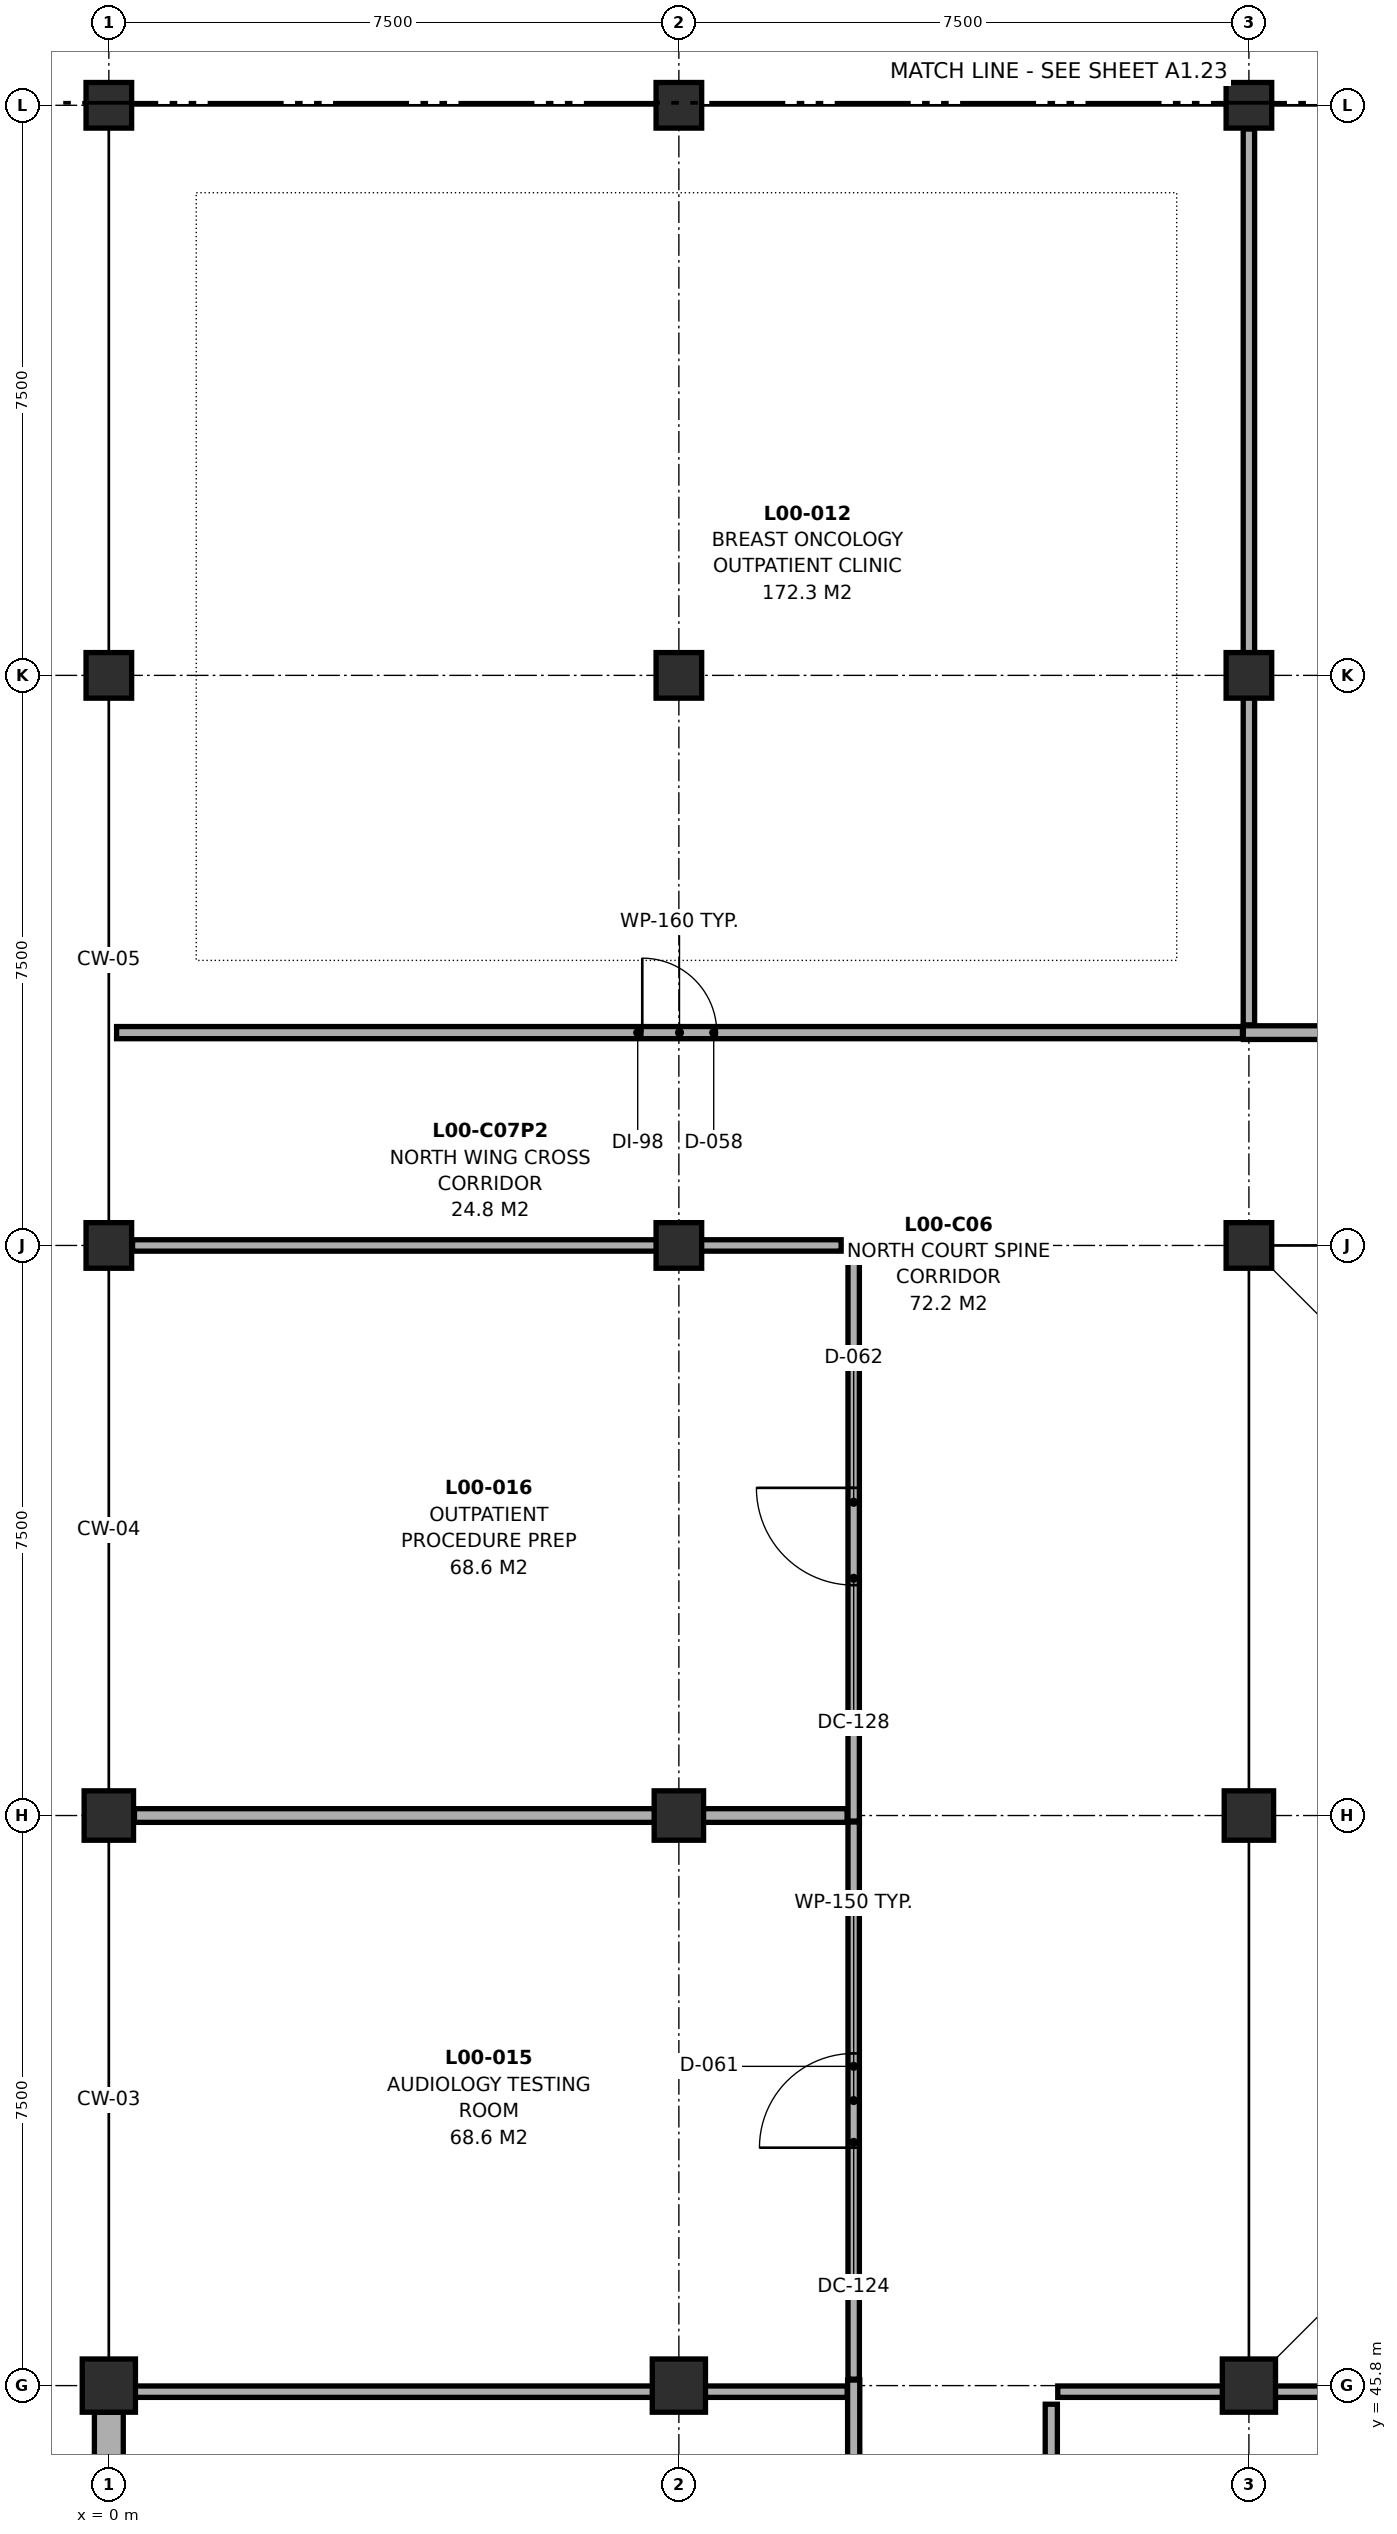
"""IFC4 building model, lengths in metres.
Left out: names, types, materials, properties, quantities, classifications, styles, units other than length and angle.
Written with IfcOpenShell. Run it as: python <this file> out.ifc"""

import sys

from ifc_helpers import new_model, si_unit, direction, frame, frame_2d, origin, origin_2d, place, context, subcontext, project, spatial, rectangle, extrude, element, fill, save


model = new_model("IFC4")
c1 = context("Model", 3, precision=1e-05, world=origin(), true_north=direction((0.0, 1.0)))
c2 = subcontext(c1, "Body", "Model", "MODEL_VIEW")
j1 = project(units=[si_unit("LENGTHUNIT", "METRE"), si_unit("PLANEANGLEUNIT", "RADIAN")], contexts=[c1])
p1 = place(None, origin())
s1 = spatial("IfcSite", under=j1, at=p1, CompositionType="ELEMENT")
p2 = place(p1, origin())
s2 = spatial("IfcBuilding", under=s1, at=p2, CompositionType="ELEMENT")
p3 = place(p2, origin())
s3 = spatial("IfcBuildingStorey", under=s2, at=p3, CompositionType="ELEMENT", Elevation=0.0)
p4 = place(p3, frame((0.0, 45.8, 0.0), z_axis=(0.0, 0.0, 1.0), x_axis=(1.0, 0.0, 0.0)))
e1 = element("IfcColumn", 1, at=p4, inside=s3, PredefinedType="COLUMN", context=c2, shape_type="SweptSolid", body=[
    extrude(rectangle(XDim=0.7, YDim=0.7, at=origin_2d()), origin(), (0.0, 0.0, 1.0), 4.7),
])
p5 = place(p3, frame((0.0, 53.3, 0.0), z_axis=(0.0, 0.0, 1.0), x_axis=(1.0, 0.0, 0.0)))
e2 = element("IfcColumn", 2, at=p5, inside=s3, PredefinedType="COLUMN", context=c2, shape_type="SweptSolid", body=[
    extrude(rectangle(XDim=0.65, YDim=0.65, at=origin_2d()), origin(), (0.0, 0.0, 1.0), 4.7),
])
for number, where, z_axis, x_axis in (
    (3, (0.0, 60.8, 0.0), (0.0, 0.0, 1.0), (1.0, 0.0, 0.0)),
    (4, (0.0, 68.3, 0.0), (0.0, 0.0, 1.0), (1.0, 0.0, 0.0)),
    (5, (0.0, 75.8, 0.0), (0.0, 0.0, 1.0), (1.0, 0.0, 0.0)),
):
    element("IfcColumn", number, at=place(p3, frame(where, z_axis=z_axis, x_axis=x_axis)), inside=s3, PredefinedType="COLUMN", context=c2, shape_type="SweptSolid", body=[
        extrude(rectangle(XDim=0.6, YDim=0.6, at=origin_2d()), origin(), (0.0, 0.0, 1.0), 4.7),
    ])
p6 = place(p3, frame((7.5, 45.8, 0.0), z_axis=(0.0, 0.0, 1.0), x_axis=(1.0, 0.0, 0.0)))
e6 = element("IfcColumn", 6, at=p6, inside=s3, PredefinedType="COLUMN", context=c2, shape_type="SweptSolid", body=[
    extrude(rectangle(XDim=0.7, YDim=0.7, at=origin_2d()), origin(), (0.0, 0.0, 1.0), 4.7),
])
p7 = place(p3, frame((7.5, 53.3, 0.0), z_axis=(0.0, 0.0, 1.0), x_axis=(1.0, 0.0, 0.0)))
e7 = element("IfcColumn", 7, at=p7, inside=s3, PredefinedType="COLUMN", context=c2, shape_type="SweptSolid", body=[
    extrude(rectangle(XDim=0.65, YDim=0.65, at=origin_2d()), origin(), (0.0, 0.0, 1.0), 4.7),
])
for number, where, z_axis, x_axis in (
    (8, (7.5, 60.8, 0.0), (0.0, 0.0, 1.0), (1.0, 0.0, 0.0)),
    (9, (7.5, 68.3, 0.0), (0.0, 0.0, 1.0), (1.0, 0.0, 0.0)),
    (10, (7.5, 75.8, 0.0), (0.0, 0.0, 1.0), (1.0, 0.0, 0.0)),
):
    element("IfcColumn", number, at=place(p3, frame(where, z_axis=z_axis, x_axis=x_axis)), inside=s3, PredefinedType="COLUMN", context=c2, shape_type="SweptSolid", body=[
        extrude(rectangle(XDim=0.6, YDim=0.6, at=origin_2d()), origin(), (0.0, 0.0, 1.0), 4.7),
    ])
p8 = place(p3, frame((15.0, 45.8, 0.0), z_axis=(0.0, 0.0, 1.0), x_axis=(1.0, 0.0, 0.0)))
e11 = element("IfcColumn", 11, at=p8, inside=s3, PredefinedType="COLUMN", context=c2, shape_type="SweptSolid", body=[
    extrude(rectangle(XDim=0.7, YDim=0.7, at=origin_2d()), origin(), (0.0, 0.0, 1.0), 4.7),
])
p9 = place(p3, frame((15.0, 53.3, 0.0), z_axis=(0.0, 0.0, 1.0), x_axis=(1.0, 0.0, 0.0)))
e12 = element("IfcColumn", 12, at=p9, inside=s3, PredefinedType="COLUMN", context=c2, shape_type="SweptSolid", body=[
    extrude(rectangle(XDim=0.65, YDim=0.65, at=origin_2d()), origin(), (0.0, 0.0, 1.0), 4.7),
])
for number, where, z_axis, x_axis in (
    (13, (15.0, 60.8, 0.0), (0.0, 0.0, 1.0), (1.0, 0.0, 0.0)),
    (14, (15.0, 68.3, 0.0), (0.0, 0.0, 1.0), (1.0, 0.0, 0.0)),
    (15, (15.0, 75.8, 0.0), (0.0, 0.0, 1.0), (1.0, 0.0, 0.0)),
):
    element("IfcColumn", number, at=place(p3, frame(where, z_axis=z_axis, x_axis=x_axis)), inside=s3, PredefinedType="COLUMN", context=c2, shape_type="SweptSolid", body=[
        extrude(rectangle(XDim=0.6, YDim=0.6, at=origin_2d()), origin(), (0.0, 0.0, 1.0), 4.7),
    ])
p10 = place(p3, frame((0.0, 38.675, 0.0), z_axis=(0.0, 0.0, 1.0), x_axis=(0.0, 1.0, 0.0)))
e16 = element("IfcWall", 16, at=p10, inside=s3, PredefinedType="SOLIDWALL", context=c2, shape_type="SweptSolid", body=[
    extrude(rectangle(XDim=6.775, YDim=0.38, at=frame_2d((3.387, 0.0))), origin(), (0.0, 0.0, 1.0), 4.035),
])
p11 = place(p3, frame((0.102, 63.6, 0.0), z_axis=(0.0, 0.0, 1.0), x_axis=(1.0, 0.0, 0.0)))
e17 = element("IfcWall", 17, at=p11, inside=s3, PredefinedType="PARTITIONING", context=c2, shape_type="SweptSolid", body=[
    extrude(rectangle(XDim=14.813, YDim=0.16, at=frame_2d((7.406, 0.0))), origin(), (0.0, 0.0, 1.0), 3.765),
])
p12 = place(p11, frame((6.917, 0.0, 0.0)))
e18 = element("IfcOpeningElement", 18, at=p12, cuts=e17, PredefinedType="OPENING", context=c2, shape_type="SweptSolid", body=[
    extrude(rectangle(XDim=0.98, YDim=2.12, at=frame_2d((0.49, 1.06))), frame((0.0, 0.092, 0.0), z_axis=(0.0, -1.0, 0.0), x_axis=(1.0, 0.0, 0.0)), (0.0, 0.0, 1.0), 0.184),
])
p13 = place(p3, frame((14.927, 63.6, 0.0), z_axis=(0.0, 0.0, 1.0), x_axis=(1.0, 0.0, 0.0)))
e19 = element("IfcWall", 19, at=p13, inside=s3, PredefinedType="PARTITIONING", context=c2, shape_type="SweptSolid", body=[
    extrude(rectangle(XDim=14.988, YDim=0.18, at=frame_2d((7.494, 0.0))), origin(), (0.0, 0.0, 1.0), 3.765),
])
p14 = place(p13, frame((6.954, 0.0, 0.0)))
e20 = element("IfcOpeningElement", 20, at=p14, cuts=e19, PredefinedType="OPENING", context=c2, shape_type="SweptSolid", body=[
    extrude(rectangle(XDim=1.08, YDim=2.18, at=frame_2d((0.54, 1.09))), frame((0.0, 0.102, 0.0), z_axis=(0.0, -1.0, 0.0), x_axis=(1.0, 0.0, 0.0)), (0.0, 0.0, 1.0), 0.204),
])
p15 = place(p3, frame((9.8, 45.885, 0.0), z_axis=(0.0, 0.0, 1.0), x_axis=(0.0, 1.0, 0.0)))
e21 = element("IfcWall", 21, at=p15, inside=s3, PredefinedType="PARTITIONING", context=c2, shape_type="SweptSolid", body=[
    extrude(rectangle(XDim=7.33, YDim=0.15, at=frame_2d((3.665, 0.0))), origin(), (0.0, 0.0, 1.0), 3.765),
])
p16 = place(p15, frame((3.045, 0.0, 0.0)))
e22 = element("IfcOpeningElement", 22, at=p16, cuts=e21, PredefinedType="OPENING", context=c2, shape_type="SweptSolid", body=[
    extrude(rectangle(XDim=1.24, YDim=2.2, at=frame_2d((0.62, 1.1))), frame((0.0, 0.087, 0.0), z_axis=(0.0, -1.0, 0.0), x_axis=(1.0, 0.0, 0.0)), (0.0, 0.0, 1.0), 0.174),
])
p17 = place(p3, frame((9.8, 53.227, 0.0), z_axis=(0.0, 0.0, 1.0), x_axis=(0.0, 1.0, 0.0)))
e23 = element("IfcWall", 23, at=p17, inside=s3, PredefinedType="PARTITIONING", context=c2, shape_type="SweptSolid", body=[
    extrude(rectangle(XDim=7.488, YDim=0.15, at=frame_2d((3.744, 0.0))), origin(), (0.0, 0.0, 1.0), 3.765),
])
p18 = place(p17, frame((3.104, 0.0, 0.0)))
e24 = element("IfcOpeningElement", 24, at=p18, cuts=e23, PredefinedType="OPENING", context=c2, shape_type="SweptSolid", body=[
    extrude(rectangle(XDim=1.28, YDim=2.22, at=frame_2d((0.64, 1.11))), frame((0.0, 0.087, 0.0), z_axis=(0.0, -1.0, 0.0), x_axis=(1.0, 0.0, 0.0)), (0.0, 0.0, 1.0), 0.174),
])
p19 = place(p3, frame((0.332, 45.72, 0.0), z_axis=(0.0, 0.0, 1.0), x_axis=(1.0, 0.0, 0.0)))
e25 = element("IfcWall", 25, at=p19, inside=s3, PredefinedType="PARTITIONING", context=c2, shape_type="SweptSolid", body=[
    extrude(rectangle(XDim=9.383, YDim=0.15, at=frame_2d((4.691, 0.0))), origin(), (0.0, 0.0, 1.0), 3.765),
])
p20 = place(p3, frame((12.485, 45.72, 0.0), z_axis=(0.0, 0.0, 1.0), x_axis=(1.0, 0.0, 0.0)))
e26 = element("IfcWall", 26, at=p20, inside=s3, PredefinedType="PARTITIONING", context=c2, shape_type="SweptSolid", body=[
    extrude(rectangle(XDim=10.063, YDim=0.15, at=frame_2d((5.031, 0.0))), origin(), (0.0, 0.0, 1.0), 3.765),
])
p21 = place(p3, frame((9.8, 35.965, 0.0), z_axis=(0.0, 0.0, 1.0), x_axis=(0.0, 1.0, 0.0)))
e27 = element("IfcWall", 27, at=p21, inside=s3, PredefinedType="PARTITIONING", context=c2, shape_type="SweptSolid", body=[
    extrude(rectangle(XDim=9.908, YDim=0.16, at=frame_2d((4.954, 0.0))), origin(), (0.0, 0.0, 1.0), 3.765),
])
p22 = place(p3, frame((12.4, 35.965, 0.0), z_axis=(0.0, 0.0, 1.0), x_axis=(0.0, 1.0, 0.0)))
e28 = element("IfcWall", 28, at=p22, inside=s3, PredefinedType="PARTITIONING", context=c2, shape_type="SweptSolid", body=[
    extrude(rectangle(XDim=9.59, YDim=0.16, at=frame_2d((4.795, 0.0))), origin(), (0.0, 0.0, 1.0), 3.765),
])
p23 = place(p3, frame((15.0, 63.702, 0.0), z_axis=(0.0, 0.0, 1.0), x_axis=(0.0, 1.0, 0.0)))
e29 = element("IfcWall", 29, at=p23, inside=s3, PredefinedType="PARTITIONING", context=c2, shape_type="SweptSolid", body=[
    extrude(rectangle(XDim=11.786, YDim=0.15, at=frame_2d((5.893, 0.0))), origin(), (0.0, 0.0, 1.0), 3.765),
])
p24 = place(p3, frame((0.337, 53.3, 0.0), z_axis=(0.0, 0.0, 1.0), x_axis=(1.0, 0.0, 0.0)))
e30 = element("IfcWall", 30, at=p24, inside=s3, PredefinedType="PARTITIONING", context=c2, shape_type="SweptSolid", body=[
    extrude(rectangle(XDim=9.376, YDim=0.18, at=frame_2d((4.688, 0.0))), origin(), (0.0, 0.0, 1.0), 3.765),
])
p25 = place(p3, frame((0.312, 60.8, 0.0), z_axis=(0.0, 0.0, 1.0), x_axis=(1.0, 0.0, 0.0)))
e31 = element("IfcWall", 31, at=p25, inside=s3, PredefinedType="PARTITIONING", context=c2, shape_type="SweptSolid", body=[
    extrude(rectangle(XDim=9.323, YDim=0.15, at=frame_2d((4.662, 0.0))), origin(), (0.0, 0.0, 1.0), 3.765),
])
p26 = place(p12, origin())
e32 = element("IfcDoor", 32, at=p26, inside=s3, OperationType="SINGLE_SWING_LEFT", PredefinedType="DOOR", context=c2, shape_type="SweptSolid", body=[
    extrude(rectangle(XDim=0.98, YDim=2.12, at=frame_2d((0.49, 1.06))), frame((0.0, 0.025, 0.0), z_axis=(0.0, -1.0, 0.0), x_axis=(1.0, 0.0, 0.0)), (0.0, 0.0, 1.0), 0.05),
])
fill(e18, e32)
p27 = place(p16, origin())
e33 = element("IfcDoor", 33, at=p27, inside=s3, OperationType="SINGLE_SWING_LEFT", PredefinedType="DOOR", context=c2, shape_type="SweptSolid", body=[
    extrude(rectangle(XDim=1.24, YDim=2.2, at=frame_2d((0.62, 1.1))), frame((0.0, 0.025, 0.0), z_axis=(0.0, -1.0, 0.0), x_axis=(1.0, 0.0, 0.0)), (0.0, 0.0, 1.0), 0.05),
])
fill(e22, e33)
p28 = place(p18, origin())
e34 = element("IfcDoor", 34, at=p28, inside=s3, OperationType="SINGLE_SWING_RIGHT", PredefinedType="DOOR", context=c2, shape_type="SweptSolid", body=[
    extrude(rectangle(XDim=1.28, YDim=2.22, at=frame_2d((0.64, 1.11))), frame((0.0, 0.025, 0.0), z_axis=(0.0, -1.0, 0.0), x_axis=(1.0, 0.0, 0.0)), (0.0, 0.0, 1.0), 0.05),
])
fill(e24, e34)
save(model, sys.argv[1])
